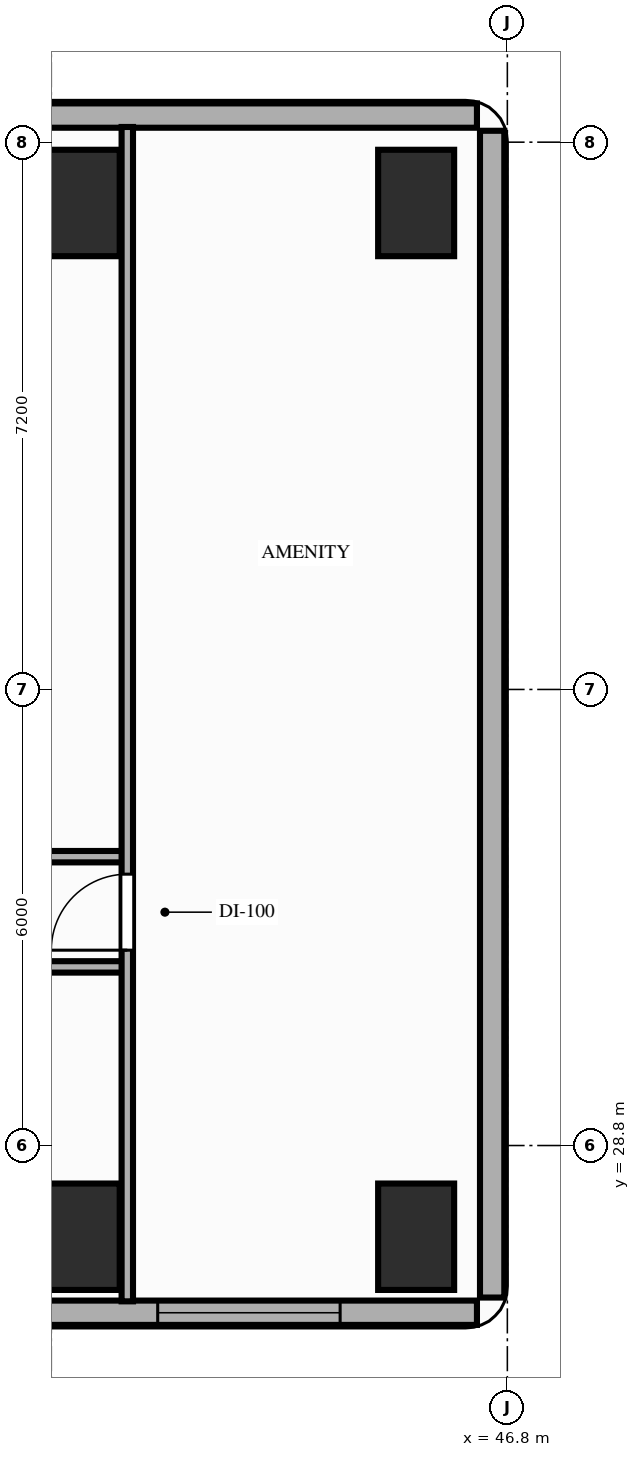
"""IFC4 building model, lengths in metres.
Left out: names, types, materials, properties, quantities, classifications, styles, units other than length and angle.
Written with IfcOpenShell. Run it as: python <this file> out.ifc"""

import sys

from ifc_helpers import new_model, si_unit, direction, frame, frame_2d, origin, origin_2d, place, context, subcontext, project, spatial, rectangle, extrude, element, fill, save


model = new_model("IFC4")
c1 = context("Model", 3, precision=1e-05, world=origin(), true_north=direction((0.0, 1.0)))
c2 = subcontext(c1, "Body", "Model", "MODEL_VIEW")
j1 = project(units=[si_unit("LENGTHUNIT", "METRE"), si_unit("PLANEANGLEUNIT", "RADIAN")], contexts=[c1])
p1 = place(None, origin())
s1 = spatial("IfcSite", under=j1, at=p1, CompositionType="ELEMENT")
p2 = place(p1, origin())
s2 = spatial("IfcBuilding", under=s1, at=p2, CompositionType="ELEMENT")
p3 = place(p2, frame((0.0, 0.0, 43.6)))
s3 = spatial("IfcBuildingStorey", under=s2, at=p3, CompositionType="ELEMENT", Elevation=43.6)
for number, where, z_axis, x_axis in (
    (1, (41.2, 27.6, 0.0), (0.0, 0.0, 1.0), (1.0, 0.0, 0.0)),
    (2, (41.2, 41.2, 0.0), (0.0, 0.0, 1.0), (1.0, 0.0, 0.0)),
    (3, (45.6, 27.6, 0.0), (0.0, 0.0, 1.0), (1.0, 0.0, 0.0)),
    (4, (45.6, 41.2, 0.0), (0.0, 0.0, 1.0), (1.0, 0.0, 0.0)),
):
    element("IfcColumn", number, at=place(p3, frame(where, z_axis=z_axis, x_axis=x_axis)), inside=s3, PredefinedType="COLUMN", context=c2, shape_type="SweptSolid", body=[
        extrude(rectangle(XDim=1.0, YDim=1.4, at=origin_2d()), origin(), (0.0, 0.0, 1.0), 3.2),
    ])
p4 = place(p3, frame((46.4, 42.35, 0.0), z_axis=(0.0, 0.0, 1.0), x_axis=(-1.0, 0.0, 0.0)))
e5 = element("IfcWall", 5, at=p4, inside=s3, PredefinedType="STANDARD", context=c2, shape_type="SweptSolid", body=[
    extrude(rectangle(XDim=19.05, YDim=0.32, at=frame_2d((9.525, 0.0))), origin(), (0.0, 0.0, 1.0), 2.41),
])
p5 = place(p3, frame((20.25, 26.6, 0.0), z_axis=(0.0, 0.0, 1.0), x_axis=(1.0, 0.0, 0.0)))
e6 = element("IfcWall", 6, at=p5, inside=s3, PredefinedType="STANDARD", context=c2, shape_type="SweptSolid", body=[
    extrude(rectangle(XDim=26.15, YDim=0.32, at=frame_2d((13.075, 0.0))), origin(), (0.0, 0.0, 1.0), 2.7),
])
p6 = place(p5, frame((1.95, 0.0, 0.85)))
e7 = element("IfcOpeningElement", 7, at=p6, cuts=e6, PredefinedType="OPENING", context=c2, shape_type="SweptSolid", body=[
    extrude(rectangle(XDim=2.4, YDim=1.6, at=frame_2d((1.2, 0.8))), frame((0.0, 0.17, 0.0), z_axis=(0.0, -1.0, 0.0), x_axis=(1.0, 0.0, 0.0)), (0.0, 0.0, 1.0), 0.34),
])
p7 = place(p5, frame((7.45, 0.0, 0.85)))
e8 = element("IfcOpeningElement", 8, at=p7, cuts=e6, PredefinedType="OPENING", context=c2, shape_type="SweptSolid", body=[
    extrude(rectangle(XDim=2.4, YDim=1.6, at=frame_2d((1.2, 0.8))), frame((0.0, 0.17, 0.0), z_axis=(0.0, -1.0, 0.0), x_axis=(1.0, 0.0, 0.0)), (0.0, 0.0, 1.0), 0.34),
])
p8 = place(p5, frame((21.95, 0.0, 0.85)))
e9 = element("IfcOpeningElement", 9, at=p8, cuts=e6, PredefinedType="OPENING", context=c2, shape_type="SweptSolid", body=[
    extrude(rectangle(XDim=2.4, YDim=1.6, at=frame_2d((1.2, 0.8))), frame((0.0, 0.17, 0.0), z_axis=(0.0, -1.0, 0.0), x_axis=(1.0, 0.0, 0.0)), (0.0, 0.0, 1.0), 0.34),
])
p9 = place(p3, frame((46.6, 26.8, 0.0), z_axis=(0.0, 0.0, 1.0), x_axis=(0.0, 1.0, 0.0)))
e10 = element("IfcWall", 10, at=p9, inside=s3, PredefinedType="STANDARD", context=c2, shape_type="SweptSolid", body=[
    extrude(rectangle(XDim=15.35, YDim=0.32, at=frame_2d((7.675, 0.0))), origin(), (0.0, 0.0, 1.0), 3.02),
])
p10 = place(p3, frame((27.15, 31.15, 0.0), z_axis=(0.0, 0.0, 1.0), x_axis=(1.0, 0.0, 0.0)))
e11 = element("IfcWall", 11, at=p10, inside=s3, PredefinedType="PARTITIONING", context=c2, shape_type="SweptSolid", body=[
    extrude(rectangle(XDim=14.65, YDim=0.15, at=frame_2d((7.325, 0.0))), origin(), (0.0, 0.0, 1.0), 2.41),
])
p11 = place(p10, frame((4.14, 0.0, 0.0)))
e12 = element("IfcOpeningElement", 12, at=p11, cuts=e11, PredefinedType="OPENING", context=c2, shape_type="SweptSolid", body=[
    extrude(rectangle(XDim=0.95, YDim=2.15, at=frame_2d((0.475, 1.075))), frame((0.0, 0.085, 0.0), z_axis=(0.0, -1.0, 0.0), x_axis=(1.0, 0.0, 0.0)), (0.0, 0.0, 1.0), 0.17),
])
p12 = place(p10, frame((11.46, 0.0, 0.0)))
e13 = element("IfcOpeningElement", 13, at=p12, cuts=e11, PredefinedType="OPENING", context=c2, shape_type="SweptSolid", body=[
    extrude(rectangle(XDim=0.95, YDim=2.15, at=frame_2d((0.475, 1.075))), frame((0.0, 0.085, 0.0), z_axis=(0.0, -1.0, 0.0), x_axis=(1.0, 0.0, 0.0)), (0.0, 0.0, 1.0), 0.17),
])
p13 = place(p3, frame((27.15, 32.6, 0.0), z_axis=(0.0, 0.0, 1.0), x_axis=(1.0, 0.0, 0.0)))
e14 = element("IfcWall", 14, at=p13, inside=s3, PredefinedType="PARTITIONING", context=c2, shape_type="SweptSolid", body=[
    extrude(rectangle(XDim=14.65, YDim=0.15, at=frame_2d((7.325, 0.0))), origin(), (0.0, 0.0, 1.0), 2.41),
])
p14 = place(p13, frame((2.38, 0.0, 0.0)))
e15 = element("IfcOpeningElement", 15, at=p14, cuts=e14, PredefinedType="OPENING", context=c2, shape_type="SweptSolid", body=[
    extrude(rectangle(XDim=0.95, YDim=2.15, at=frame_2d((0.475, 1.075))), frame((0.0, 0.085, 0.0), z_axis=(0.0, -1.0, 0.0), x_axis=(1.0, 0.0, 0.0)), (0.0, 0.0, 1.0), 0.17),
])
p15 = place(p13, frame((7.29, 0.0, 0.0)))
e16 = element("IfcOpeningElement", 16, at=p15, cuts=e14, PredefinedType="OPENING", context=c2, shape_type="SweptSolid", body=[
    extrude(rectangle(XDim=0.95, YDim=2.15, at=frame_2d((0.475, 1.075))), frame((0.0, 0.085, 0.0), z_axis=(0.0, -1.0, 0.0), x_axis=(1.0, 0.0, 0.0)), (0.0, 0.0, 1.0), 0.17),
])
p16 = place(p13, frame((11.75, 0.0, 0.0)))
e17 = element("IfcOpeningElement", 17, at=p16, cuts=e14, PredefinedType="OPENING", context=c2, shape_type="SweptSolid", body=[
    extrude(rectangle(XDim=0.95, YDim=2.15, at=frame_2d((0.475, 1.075))), frame((0.0, 0.085, 0.0), z_axis=(0.0, -1.0, 0.0), x_axis=(1.0, 0.0, 0.0)), (0.0, 0.0, 1.0), 0.17),
])
p17 = place(p3, frame((41.8, 26.75, 0.0), z_axis=(0.0, 0.0, 1.0), x_axis=(0.0, 1.0, 0.0)))
e18 = element("IfcWall", 18, at=p17, inside=s3, PredefinedType="PARTITIONING", context=c2, shape_type="SweptSolid", body=[
    extrude(rectangle(XDim=15.45, YDim=0.15, at=frame_2d((7.725, 0.0))), origin(), (0.0, 0.0, 1.0), 2.41),
])
p18 = place(p17, frame((4.62, 0.0, 0.0)))
e19 = element("IfcOpeningElement", 19, at=p18, cuts=e18, PredefinedType="OPENING", context=c2, shape_type="SweptSolid", body=[
    extrude(rectangle(XDim=1.0, YDim=2.15, at=frame_2d((0.5, 1.075))), frame((0.0, 0.085, 0.0), z_axis=(0.0, -1.0, 0.0), x_axis=(1.0, 0.0, 0.0)), (0.0, 0.0, 1.0), 0.17),
])
p19 = place(p8, origin())
e20 = element("IfcWindow", 20, at=p19, inside=s3, PartitioningType="SINGLE_PANEL", PredefinedType="WINDOW", context=c2, shape_type="SweptSolid", body=[
    extrude(rectangle(XDim=2.4, YDim=1.6, at=frame_2d((1.2, 0.8))), frame((0.0, 0.03, 0.0), z_axis=(0.0, -1.0, 0.0), x_axis=(1.0, 0.0, 0.0)), (0.0, 0.0, 1.0), 0.06),
])
fill(e9, e20)
p20 = place(p18, origin())
e21 = element("IfcDoor", 21, at=p20, inside=s3, OperationType="SINGLE_SWING_LEFT", PredefinedType="DOOR", context=c2, shape_type="SweptSolid", body=[
    extrude(rectangle(XDim=1.0, YDim=2.15, at=frame_2d((0.5, 1.075))), frame((0.0, 0.025, 0.0), z_axis=(0.0, -1.0, 0.0), x_axis=(1.0, 0.0, 0.0)), (0.0, 0.0, 1.0), 0.05),
])
fill(e19, e21)
save(model, sys.argv[1])
